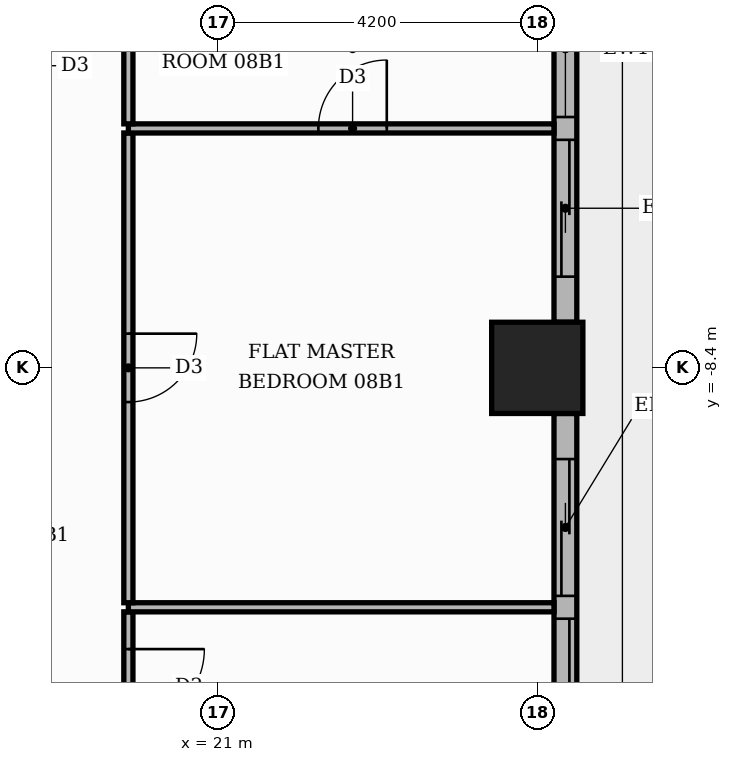
"""IFC4 building model, lengths in metres.
Left out: names, types, materials, properties, quantities, classifications, styles, units other than length and angle.
Written with IfcOpenShell. Run it as: python <this file> out.ifc"""

import sys

from ifc_helpers import new_model, si_unit, direction, frame, frame_2d, origin, origin_2d, place, context, subcontext, project, spatial, rectangle, extrude, element, fill, save


model = new_model("IFC4")
c1 = context("Model", 3, precision=1e-05, world=origin(), true_north=direction((0.0, 1.0)))
c2 = subcontext(c1, "Body", "Model", "MODEL_VIEW")
j1 = project(units=[si_unit("LENGTHUNIT", "METRE"), si_unit("PLANEANGLEUNIT", "RADIAN")], contexts=[c1])
p1 = place(None, origin())
s1 = spatial("IfcSite", under=j1, at=p1, CompositionType="ELEMENT")
p2 = place(p1, origin())
s2 = spatial("IfcBuilding", under=s1, at=p2, CompositionType="ELEMENT")
p3 = place(p2, frame((0.0, 0.0, 38.7)))
s3 = spatial("IfcBuildingStorey", under=s2, at=p3, CompositionType="ELEMENT", Elevation=38.7)
p4 = place(p3, frame((25.2, -8.4, 0.0), z_axis=(0.0, 0.0, 1.0), x_axis=(1.0, 0.0, 0.0)))
e1 = element("IfcColumn", 1, at=p4, inside=s3, PredefinedType="COLUMN", context=c2, shape_type="SweptSolid", body=[
    extrude(rectangle(XDim=1.2, YDim=1.2, at=origin_2d()), origin(), (0.0, 0.0, 1.0), 3.9),
])
p5 = place(p3, frame((25.57, -16.2, 0.0), z_axis=(0.0, 0.0, 1.0), x_axis=(0.0, 1.0, 0.0)))
e2 = element("IfcWall", 2, at=p5, inside=s3, PredefinedType="STANDARD", context=c2, shape_type="SweptSolid", body=[
    extrude(rectangle(XDim=7.2, YDim=0.3, at=frame_2d((3.6, 0.0))), origin(), (0.0, 0.0, 1.0), 3.48),
])
p6 = place(p5, frame((0.6, 0.0, 0.0)))
e3 = element("IfcOpeningElement", 3, at=p6, cuts=e2, PredefinedType="OPENING", context=c2, shape_type="SweptSolid", body=[
    extrude(rectangle(XDim=3.9, YDim=2.4, at=frame_2d((1.95, 1.2))), frame((0.0, 0.16, 0.0), z_axis=(0.0, -1.0, 0.0), x_axis=(1.0, 0.0, 0.0)), (0.0, 0.0, 1.0), 0.32),
])
p7 = place(p5, frame((4.8, 0.0, 0.0)))
e4 = element("IfcOpeningElement", 4, at=p7, cuts=e2, PredefinedType="OPENING", context=c2, shape_type="SweptSolid", body=[
    extrude(rectangle(XDim=1.8, YDim=2.4, at=frame_2d((0.9, 1.2))), frame((0.0, 0.16, 0.0), z_axis=(0.0, -1.0, 0.0), x_axis=(1.0, 0.0, 0.0)), (0.0, 0.0, 1.0), 0.32),
])
p8 = place(p3, frame((25.57, -7.8, 0.0), z_axis=(0.0, 0.0, 1.0), x_axis=(0.0, 1.0, 0.0)))
e5 = element("IfcWall", 5, at=p8, inside=s3, PredefinedType="STANDARD", context=c2, shape_type="SweptSolid", body=[
    extrude(rectangle(XDim=7.2, YDim=0.3, at=frame_2d((3.6, 0.0))), origin(), (0.0, 0.0, 1.0), 3.48),
])
p9 = place(p8, frame((0.6, 0.0, 0.0)))
e6 = element("IfcOpeningElement", 6, at=p9, cuts=e5, PredefinedType="OPENING", context=c2, shape_type="SweptSolid", body=[
    extrude(rectangle(XDim=1.8, YDim=2.4, at=frame_2d((0.9, 1.2))), frame((0.0, 0.16, 0.0), z_axis=(0.0, -1.0, 0.0), x_axis=(1.0, 0.0, 0.0)), (0.0, 0.0, 1.0), 0.32),
])
p10 = place(p8, frame((2.7, 0.0, 0.9)))
e7 = element("IfcOpeningElement", 7, at=p10, cuts=e5, PredefinedType="OPENING", context=c2, shape_type="SweptSolid", body=[
    extrude(rectangle(XDim=1.8, YDim=2.1, at=frame_2d((0.9, 1.05))), frame((0.0, 0.16, 0.0), z_axis=(0.0, -1.0, 0.0), x_axis=(1.0, 0.0, 0.0)), (0.0, 0.0, 1.0), 0.32),
])
p11 = place(p8, frame((4.8, 0.0, 0.9)))
e8 = element("IfcOpeningElement", 8, at=p11, cuts=e5, PredefinedType="OPENING", context=c2, shape_type="SweptSolid", body=[
    extrude(rectangle(XDim=1.8, YDim=2.1, at=frame_2d((0.9, 1.05))), frame((0.0, 0.16, 0.0), z_axis=(0.0, -1.0, 0.0), x_axis=(1.0, 0.0, 0.0)), (0.0, 0.0, 1.0), 0.32),
])
p12 = place(p3, frame((19.82, -13.59, 0.0), z_axis=(0.0, 0.0, 1.0), x_axis=(0.0, 1.0, 0.0)))
e9 = element("IfcWall", 9, at=p12, inside=s3, PredefinedType="PARTITIONING", context=c2, shape_type="SweptSolid", body=[
    extrude(rectangle(XDim=1.98, YDim=0.12, at=frame_2d((0.99, 0.0))), origin(), (0.0, 0.0, 1.0), 3.48),
])
p13 = place(p12, frame((0.49, 0.0, 0.0)))
e10 = element("IfcOpeningElement", 10, at=p13, cuts=e9, PredefinedType="OPENING", context=c2, shape_type="SweptSolid", body=[
    extrude(rectangle(XDim=1.0, YDim=2.1, at=frame_2d((0.5, 1.05))), frame((0.0, 0.07, 0.0), z_axis=(0.0, -1.0, 0.0), x_axis=(1.0, 0.0, 0.0)), (0.0, 0.0, 1.0), 0.14),
])
p14 = place(p3, frame((19.82, -11.55, 0.0), z_axis=(0.0, 0.0, 1.0), x_axis=(1.0, 0.0, 0.0)))
e11 = element("IfcWall", 11, at=p14, inside=s3, PredefinedType="PARTITIONING", context=c2, shape_type="SweptSolid", body=[
    extrude(rectangle(XDim=5.6, YDim=0.12, at=frame_2d((2.8, 0.0))), origin(), (0.0, 0.0, 1.0), 3.48),
])
p15 = place(p3, frame((19.82, -11.49, 0.0), z_axis=(0.0, 0.0, 1.0), x_axis=(0.0, 1.0, 0.0)))
e12 = element("IfcWall", 12, at=p15, inside=s3, PredefinedType="PARTITIONING", context=c2, shape_type="SweptSolid", body=[
    extrude(rectangle(XDim=6.18, YDim=0.12, at=frame_2d((3.09, 0.0))), origin(), (0.0, 0.0, 1.0), 3.48),
])
p16 = place(p15, frame((2.64, 0.0, 0.0)))
e13 = element("IfcOpeningElement", 13, at=p16, cuts=e12, PredefinedType="OPENING", context=c2, shape_type="SweptSolid", body=[
    extrude(rectangle(XDim=0.9, YDim=2.1, at=frame_2d((0.45, 1.05))), frame((0.0, 0.07, 0.0), z_axis=(0.0, -1.0, 0.0), x_axis=(1.0, 0.0, 0.0)), (0.0, 0.0, 1.0), 0.14),
])
p17 = place(p3, frame((19.82, -5.25, 0.0), z_axis=(0.0, 0.0, 1.0), x_axis=(1.0, 0.0, 0.0)))
e14 = element("IfcWall", 14, at=p17, inside=s3, PredefinedType="PARTITIONING", context=c2, shape_type="SweptSolid", body=[
    extrude(rectangle(XDim=5.6, YDim=0.12, at=frame_2d((2.8, 0.0))), origin(), (0.0, 0.0, 1.0), 3.48),
])
p18 = place(p17, frame((2.5, 0.0, 0.0)))
e15 = element("IfcOpeningElement", 15, at=p18, cuts=e14, PredefinedType="OPENING", context=c2, shape_type="SweptSolid", body=[
    extrude(rectangle(XDim=0.9, YDim=2.1, at=frame_2d((0.45, 1.05))), frame((0.0, 0.07, 0.0), z_axis=(0.0, -1.0, 0.0), x_axis=(1.0, 0.0, 0.0)), (0.0, 0.0, 1.0), 0.14),
])
p19 = place(p3, frame((19.82, -5.19, 0.0), z_axis=(0.0, 0.0, 1.0), x_axis=(0.0, 1.0, 0.0)))
e16 = element("IfcWall", 16, at=p19, inside=s3, PredefinedType="PARTITIONING", context=c2, shape_type="SweptSolid", body=[
    extrude(rectangle(XDim=1.98, YDim=0.12, at=frame_2d((0.99, 0.0))), origin(), (0.0, 0.0, 1.0), 3.48),
])
p20 = place(p6, origin())
e17 = element("IfcDoor", 17, at=p20, inside=s3, OperationType="SLIDING_TO_LEFT", PredefinedType="DOOR", context=c2, shape_type="SweptSolid", body=[
    extrude(rectangle(XDim=3.9, YDim=2.4, at=frame_2d((1.95, 1.2))), frame((0.0, 0.025, 0.0), z_axis=(0.0, -1.0, 0.0), x_axis=(1.0, 0.0, 0.0)), (0.0, 0.0, 1.0), 0.05),
])
fill(e3, e17)
p21 = place(p7, origin())
e18 = element("IfcDoor", 18, at=p21, inside=s3, OperationType="SLIDING_TO_RIGHT", PredefinedType="DOOR", context=c2, shape_type="SweptSolid", body=[
    extrude(rectangle(XDim=1.8, YDim=2.4, at=frame_2d((0.9, 1.2))), frame((0.0, 0.025, 0.0), z_axis=(0.0, -1.0, 0.0), x_axis=(1.0, 0.0, 0.0)), (0.0, 0.0, 1.0), 0.05),
])
fill(e4, e18)
p22 = place(p9, origin())
e19 = element("IfcDoor", 19, at=p22, inside=s3, OperationType="SLIDING_TO_LEFT", PredefinedType="DOOR", context=c2, shape_type="SweptSolid", body=[
    extrude(rectangle(XDim=1.8, YDim=2.4, at=frame_2d((0.9, 1.2))), frame((0.0, 0.025, 0.0), z_axis=(0.0, -1.0, 0.0), x_axis=(1.0, 0.0, 0.0)), (0.0, 0.0, 1.0), 0.05),
])
fill(e6, e19)
p23 = place(p10, origin())
e20 = element("IfcWindow", 20, at=p23, inside=s3, PartitioningType="SINGLE_PANEL", PredefinedType="WINDOW", context=c2, shape_type="SweptSolid", body=[
    extrude(rectangle(XDim=1.8, YDim=2.1, at=frame_2d((0.9, 1.05))), frame((0.0, 0.03, 0.0), z_axis=(0.0, -1.0, 0.0), x_axis=(1.0, 0.0, 0.0)), (0.0, 0.0, 1.0), 0.06),
])
fill(e7, e20)
p24 = place(p13, frame((1.0, 0.0, 0.0), z_axis=(0.0, 0.0, 1.0), x_axis=(-1.0, 0.0, 0.0)))
e21 = element("IfcDoor", 21, at=p24, inside=s3, OperationType="SINGLE_SWING_RIGHT", PredefinedType="DOOR", context=c2, shape_type="SweptSolid", body=[
    extrude(rectangle(XDim=1.0, YDim=2.1, at=frame_2d((0.5, 1.05))), frame((0.0, 0.025, 0.0), z_axis=(0.0, -1.0, 0.0), x_axis=(1.0, 0.0, 0.0)), (0.0, 0.0, 1.0), 0.05),
])
fill(e10, e21)
p25 = place(p16, frame((0.9, 0.0, 0.0), z_axis=(0.0, 0.0, 1.0), x_axis=(-1.0, 0.0, 0.0)))
e22 = element("IfcDoor", 22, at=p25, inside=s3, OperationType="SINGLE_SWING_RIGHT", PredefinedType="DOOR", context=c2, shape_type="SweptSolid", body=[
    extrude(rectangle(XDim=0.9, YDim=2.1, at=frame_2d((0.45, 1.05))), frame((0.0, 0.025, 0.0), z_axis=(0.0, -1.0, 0.0), x_axis=(1.0, 0.0, 0.0)), (0.0, 0.0, 1.0), 0.05),
])
fill(e13, e22)
p26 = place(p18, origin())
e23 = element("IfcDoor", 23, at=p26, inside=s3, OperationType="SINGLE_SWING_RIGHT", PredefinedType="DOOR", context=c2, shape_type="SweptSolid", body=[
    extrude(rectangle(XDim=0.9, YDim=2.1, at=frame_2d((0.45, 1.05))), frame((0.0, 0.025, 0.0), z_axis=(0.0, -1.0, 0.0), x_axis=(1.0, 0.0, 0.0)), (0.0, 0.0, 1.0), 0.05),
])
fill(e15, e23)
save(model, sys.argv[1])
